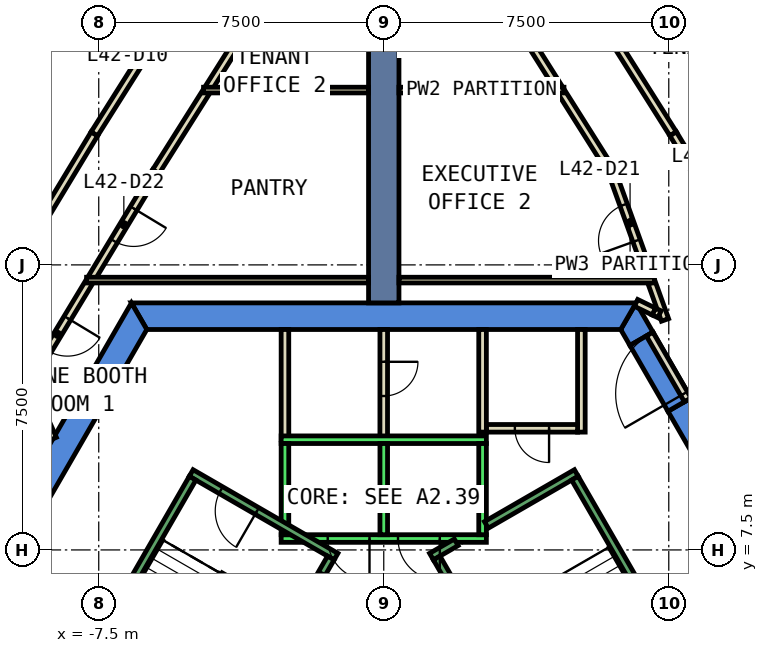
"""IFC4 building model, lengths in metres.
Left out: names, types, materials, properties, quantities, classifications, styles, units other than length and angle.
Written with IfcOpenShell. Run it as: python <this file> out.ifc"""

import sys

from ifc_helpers import new_model, si_unit, direction, frame, frame_2d, origin, place, context, subcontext, project, spatial, polyline, rectangle, outline, extrude, element, fill, save


model = new_model("IFC4")
c1 = context("Model", 3, precision=1e-05, world=origin(), true_north=direction((0.0, 1.0)))
c2 = subcontext(c1, "Body", "Model", "MODEL_VIEW")
j1 = project(units=[si_unit("LENGTHUNIT", "METRE"), si_unit("PLANEANGLEUNIT", "RADIAN")], contexts=[c1])
p1 = place(None, origin())
s1 = spatial("IfcSite", under=j1, at=p1, CompositionType="ELEMENT")
p2 = place(p1, origin())
s2 = spatial("IfcBuilding", under=s1, at=p2, CompositionType="ELEMENT")
p3 = place(p2, frame((0.0, 0.0, 189.8)))
s3 = spatial("IfcBuildingStorey", under=s2, at=p3, CompositionType="ELEMENT", Elevation=189.8)
p4 = place(p3, frame((0.0, 0.0, -0.6)))
e1 = element("IfcWall", 1, at=p4, inside=s3, PredefinedType="SHEAR", context=c2, shape_type="SweptSolid", body=[
    extrude(outline(polyline([(8.084, 11.498), (7.478, 11.148), (12.471, 2.5), (13.279, 2.5), (8.084, 11.498)])), origin(), (0.0, 0.0, 1.0), 4.4),
])
p5 = place(p3, frame((0.0, 0.0, -0.6)))
e2 = element("IfcWall", 2, at=p5, inside=s3, PredefinedType="SHEAR", context=c2, shape_type="SweptSolid", body=[
    extrude(outline(polyline([(6.478, 12.88), (7.084, 13.23), (6.64, 14.0), (6.235, 13.3), (6.478, 12.88)])), origin(), (0.0, 0.0, 1.0), 4.4),
])
p6 = place(p3, frame((0.0, 0.0, 3.6)))
e3 = element("IfcWall", 3, at=p6, inside=s3, PredefinedType="SHEAR", context=c2, shape_type="SweptSolid", body=[
    extrude(outline(polyline([(7.084, 13.23), (6.478, 12.88), (7.478, 11.148), (8.084, 11.498), (7.084, 13.23)])), origin(), (0.0, 0.0, 1.0), 0.2),
])
p7 = place(p3, frame((0.0, 0.0, -0.6)))
e4 = element("IfcWall", 4, at=p7, inside=s3, PredefinedType="SHEAR", context=c2, shape_type="SweptSolid", body=[
    extrude(outline(polyline([(6.64, 14.0), (-6.64, 14.0), (-6.235, 13.3), (6.235, 13.3), (6.64, 14.0)])), origin(), (0.0, 0.0, 1.0), 4.4),
])
p8 = place(p3, frame((0.0, 0.0, -0.6)))
e5 = element("IfcWall", 5, at=p8, inside=s3, PredefinedType="SHEAR", context=c2, shape_type="SweptSolid", body=[
    extrude(outline(polyline([(-11.834, 5.002), (-11.228, 4.652), (-6.235, 13.3), (-6.64, 14.0), (-11.834, 5.002)])), origin(), (0.0, 0.0, 1.0), 4.4),
])
p9 = place(p3, frame((0.0, 14.0, -0.6), z_axis=(0.0, 0.0, 1.0), x_axis=(0.0, 1.0, 0.0)))
e6 = element("IfcWall", 6, at=p9, inside=s3, PredefinedType="SHEAR", context=c2, shape_type="SweptSolid", body=[
    extrude(rectangle(XDim=9.0, YDim=0.8, at=frame_2d((4.5, 0.0))), origin(), (0.0, 0.0, 1.0), 4.4),
])
p10 = place(p3, frame((6.64, 14.0, 0.0), z_axis=(0.0, 0.0, 1.0), x_axis=(0.899046412443, -0.437853341055, 0.0)))
e7 = element("IfcWall", 7, at=p10, inside=s3, PredefinedType="PARTITIONING", context=c2, shape_type="SweptSolid", body=[
    extrude(rectangle(XDim=0.523, YDim=0.2, at=frame_2d((0.261, 0.0))), origin(), (0.0, 0.0, 1.0), 3.8),
])
p11 = place(p3, frame((7.401, 13.552, 0.0), z_axis=(0.0, 0.0, 1.0), x_axis=(-0.337944878606, 0.941165904091, 0.0)))
e8 = element("IfcWall", 8, at=p11, inside=s3, PredefinedType="PARTITIONING", context=c2, shape_type="SweptSolid", body=[
    extrude(rectangle(XDim=1.038, YDim=0.2, at=frame_2d((0.519, 0.0))), origin(), (0.0, 0.0, 1.0), 3.8),
])
p12 = place(p3, frame((-7.759, 14.536, 0.0), z_axis=(0.0, 0.0, 1.0), x_axis=(-0.516926279395, -0.856029918678, 0.0)))
e9 = element("IfcWall", 9, at=p12, inside=s3, PredefinedType="PARTITIONING", context=c2, shape_type="SweptSolid", body=[
    extrude(rectangle(XDim=3.188, YDim=0.2, at=frame_2d((1.594, 0.0))), origin(), (0.0, 0.0, 1.0), 3.8),
])
p13 = place(p12, frame((1.094, 0.0, 0.0)))
e10 = element("IfcOpeningElement", 10, at=p13, cuts=e9, PredefinedType="OPENING", context=c2, shape_type="SweptSolid", body=[
    extrude(rectangle(XDim=1.0, YDim=2.1, at=frame_2d((0.5, 1.05))), frame((0.0, 0.11, 0.0), z_axis=(0.0, -1.0, 0.0), x_axis=(1.0, 0.0, 0.0)), (0.0, 0.0, 1.0), 0.22),
])
p14 = place(p3, frame((-9.315, 11.801, 0.0), z_axis=(0.0, 0.0, 1.0), x_axis=(0.403943240321, -0.914784050254, 0.0)))
e11 = element("IfcWall", 11, at=p14, inside=s3, PredefinedType="PARTITIONING", context=c2, shape_type="SweptSolid", body=[
    extrude(rectangle(XDim=1.507, YDim=0.2, at=frame_2d((0.754, 0.0))), origin(), (0.0, 0.0, 1.0), 3.8),
])
p15 = place(p3, frame((6.999, 14.671, 0.0), z_axis=(0.0, 0.0, 1.0), x_axis=(-0.338795881304, 0.940859899672, 0.0)))
e12 = element("IfcWall", 12, at=p15, inside=s3, PredefinedType="PARTITIONING", context=c2, shape_type="SweptSolid", body=[
    extrude(rectangle(XDim=3.055, YDim=0.2, at=frame_2d((1.527, 0.0))), origin(), (0.0, 0.0, 1.0), 3.8),
])
p16 = place(p15, frame((1.027, 0.0, 0.0)))
e13 = element("IfcOpeningElement", 13, at=p16, cuts=e12, PredefinedType="OPENING", context=c2, shape_type="SweptSolid", body=[
    extrude(rectangle(XDim=1.0, YDim=2.1, at=frame_2d((0.5, 1.05))), frame((0.0, 0.11, 0.0), z_axis=(0.0, -1.0, 0.0), x_axis=(1.0, 0.0, 0.0)), (0.0, 0.0, 1.0), 0.22),
])
p17 = place(p3, frame((5.945, 17.535, 0.0), z_axis=(0.0, 0.0, 1.0), x_axis=(-0.533581643518, 0.845748561749, 0.0)))
e14 = element("IfcWall", 14, at=p17, inside=s3, PredefinedType="PARTITIONING", context=c2, shape_type="SweptSolid", body=[
    extrude(rectangle(XDim=2.367, YDim=0.2, at=frame_2d((1.184, 0.0))), origin(), (0.0, 0.0, 1.0), 3.8),
])
p18 = place(p3, frame((-4.682, 19.537, 0.0), z_axis=(0.0, 0.0, 1.0), x_axis=(-0.533579580306, -0.845749863423, 0.0)))
e15 = element("IfcWall", 15, at=p18, inside=s3, PredefinedType="PARTITIONING", context=c2, shape_type="SweptSolid", body=[
    extrude(rectangle(XDim=2.467, YDim=0.2, at=frame_2d((1.233, 0.0))), origin(), (0.0, 0.0, 1.0), 3.8),
])
p19 = place(p3, frame((-5.998, 17.451, 0.0), z_axis=(0.0, 0.0, 1.0), x_axis=(-0.516919907997, -0.856033766108, 0.0)))
e16 = element("IfcWall", 16, at=p19, inside=s3, PredefinedType="PARTITIONING", context=c2, shape_type="SweptSolid", body=[
    extrude(rectangle(XDim=3.256, YDim=0.2, at=frame_2d((1.628, 0.0))), origin(), (0.0, 0.0, 1.0), 3.8),
])
p20 = place(p19, frame((1.128, 0.0, 0.0)))
e17 = element("IfcOpeningElement", 17, at=p20, cuts=e16, PredefinedType="OPENING", context=c2, shape_type="SweptSolid", body=[
    extrude(rectangle(XDim=1.0, YDim=2.1, at=frame_2d((0.5, 1.05))), frame((0.0, 0.11, 0.0), z_axis=(0.0, -1.0, 0.0), x_axis=(1.0, 0.0, 0.0)), (0.0, 0.0, 1.0), 0.22),
])
p21 = place(p3, frame((4.602, 19.663, 0.0), z_axis=(0.0, 0.0, 1.0), x_axis=(-0.533664968846, 0.845695986171, 0.0)))
e18 = element("IfcWall", 18, at=p21, inside=s3, PredefinedType="PARTITIONING", context=c2, shape_type="SweptSolid", body=[
    extrude(rectangle(XDim=4.621, YDim=0.2, at=frame_2d((2.311, 0.0))), origin(), (0.0, 0.0, 1.0), 3.8),
])
p22 = place(p21, frame((1.81, 0.0, 0.0)))
e19 = element("IfcOpeningElement", 19, at=p22, cuts=e18, PredefinedType="OPENING", context=c2, shape_type="SweptSolid", body=[
    extrude(rectangle(XDim=1.0, YDim=2.1, at=frame_2d((0.5, 1.05))), frame((0.0, 0.11, 0.0), z_axis=(0.0, -1.0, 0.0), x_axis=(1.0, 0.0, 0.0)), (0.0, 0.0, 1.0), 0.22),
])
p23 = place(p3, frame((-2.136, 23.571, 0.0), z_axis=(0.0, 0.0, 1.0), x_axis=(-0.533664968846, -0.845695986171, 0.0)))
e20 = element("IfcWall", 20, at=p23, inside=s3, PredefinedType="PARTITIONING", context=c2, shape_type="SweptSolid", body=[
    extrude(rectangle(XDim=4.621, YDim=0.2, at=frame_2d((2.311, 0.0))), origin(), (0.0, 0.0, 1.0), 3.8),
])
p24 = place(p23, frame((1.81, 0.0, 0.0)))
e21 = element("IfcOpeningElement", 21, at=p24, cuts=e20, PredefinedType="OPENING", context=c2, shape_type="SweptSolid", body=[
    extrude(rectangle(XDim=1.0, YDim=2.1, at=frame_2d((0.5, 1.05))), frame((0.0, 0.11, 0.0), z_axis=(0.0, -1.0, 0.0), x_axis=(1.0, 0.0, 0.0)), (0.0, 0.0, 1.0), 0.22),
])
p25 = place(p3, frame((5.489, 21.817, 0.0), z_axis=(0.0, 0.0, 1.0), x_axis=(0.533790022325, -0.845617059943, 0.0)))
e22 = element("IfcWall", 22, at=p25, inside=s3, PredefinedType="PARTITIONING", context=c2, shape_type="SweptSolid", body=[
    extrude(rectangle(XDim=3.983, YDim=0.2, at=frame_2d((1.991, 0.0))), origin(), (0.0, 0.0, 1.0), 3.8),
])
p26 = place(p3, frame((7.615, 18.449, 0.0), z_axis=(0.0, 0.0, 1.0), x_axis=(0.516918251554, -0.856034766356, 0.0)))
e23 = element("IfcWall", 23, at=p26, inside=s3, PredefinedType="PARTITIONING", context=c2, shape_type="SweptSolid", body=[
    extrude(rectangle(XDim=3.983, YDim=0.2, at=frame_2d((1.992, 0.0))), origin(), (0.0, 0.0, 1.0), 3.8),
])
p27 = place(p26, frame((1.492, 0.0, 0.0)))
e24 = element("IfcOpeningElement", 24, at=p27, cuts=e23, PredefinedType="OPENING", context=c2, shape_type="SweptSolid", body=[
    extrude(rectangle(XDim=1.0, YDim=2.1, at=frame_2d((0.5, 1.05))), frame((0.0, 0.11, 0.0), z_axis=(0.0, -1.0, 0.0), x_axis=(1.0, 0.0, 0.0)), (0.0, 0.0, 1.0), 0.22),
])
p28 = place(p3, frame((-9.674, 15.039, 0.0), z_axis=(0.0, 0.0, 1.0), x_axis=(0.516918251554, 0.856034766356, 0.0)))
e25 = element("IfcWall", 25, at=p28, inside=s3, PredefinedType="PARTITIONING", context=c2, shape_type="SweptSolid", body=[
    extrude(rectangle(XDim=3.983, YDim=0.2, at=frame_2d((1.992, 0.0))), origin(), (0.0, 0.0, 1.0), 3.8),
])
p29 = place(p3, frame((-7.615, 18.449, 0.0), z_axis=(0.0, 0.0, 1.0), x_axis=(0.533699180497, 0.845674396406, 0.0)))
e26 = element("IfcWall", 26, at=p29, inside=s3, PredefinedType="PARTITIONING", context=c2, shape_type="SweptSolid", body=[
    extrude(rectangle(XDim=7.504, YDim=0.2, at=frame_2d((3.752, 0.0))), origin(), (0.0, 0.0, 1.0), 3.8),
])
p30 = place(p29, frame((3.252, 0.0, 0.0)))
e27 = element("IfcOpeningElement", 27, at=p30, cuts=e26, PredefinedType="OPENING", context=c2, shape_type="SweptSolid", body=[
    extrude(rectangle(XDim=1.0, YDim=2.1, at=frame_2d((0.5, 1.05))), frame((0.0, 0.11, 0.0), z_axis=(0.0, -1.0, 0.0), x_axis=(1.0, 0.0, 0.0)), (0.0, 0.0, 1.0), 0.22),
])
p31 = place(p3, frame((5.2, 13.3, 0.0), z_axis=(0.0, 0.0, 1.0), x_axis=(0.0, -1.0, 0.0)))
e28 = element("IfcWall", 28, at=p31, inside=s3, PredefinedType="PARTITIONING", context=c2, shape_type="SweptSolid", body=[
    extrude(rectangle(XDim=2.7, YDim=0.2, at=frame_2d((1.35, 0.0))), origin(), (0.0, 0.0, 1.0), 3.8),
])
p32 = place(p3, frame((5.1, 10.7, 0.0), z_axis=(0.0, 0.0, 1.0), x_axis=(-1.0, 0.0, 0.0)))
e29 = element("IfcWall", 29, at=p32, inside=s3, PredefinedType="PARTITIONING", context=c2, shape_type="SweptSolid", body=[
    extrude(rectangle(XDim=2.4, YDim=0.2, at=frame_2d((1.2, 0.0))), origin(), (0.0, 0.0, 1.0), 3.8),
])
p33 = place(p32, frame((0.75, 0.0, 0.0)))
e30 = element("IfcOpeningElement", 30, at=p33, cuts=e29, PredefinedType="OPENING", context=c2, shape_type="SweptSolid", body=[
    extrude(rectangle(XDim=0.9, YDim=2.1, at=frame_2d((0.45, 1.05))), frame((0.0, 0.11, 0.0), z_axis=(0.0, -1.0, 0.0), x_axis=(1.0, 0.0, 0.0)), (0.0, 0.0, 1.0), 0.22),
])
p34 = place(p3, frame((2.6, 10.6, 0.0), z_axis=(0.0, 0.0, 1.0), x_axis=(0.0, 1.0, 0.0)))
e31 = element("IfcWall", 31, at=p34, inside=s3, PredefinedType="PARTITIONING", context=c2, shape_type="SweptSolid", body=[
    extrude(rectangle(XDim=2.7, YDim=0.2, at=frame_2d((1.35, 0.0))), origin(), (0.0, 0.0, 1.0), 3.8),
])
p35 = place(p3, frame((-2.599, 10.399, 0.0), z_axis=(0.0, 0.0, 1.0), x_axis=(-0.000336615314, 0.999999943345, 0.0)))
e32 = element("IfcWall", 32, at=p35, inside=s3, PredefinedType="PARTITIONING", context=c2, shape_type="SweptSolid", body=[
    extrude(rectangle(XDim=2.901, YDim=0.2, at=frame_2d((1.451, 0.0))), origin(), (0.0, 0.0, 1.0), 3.8),
])
p36 = place(p3, frame((0.0, 13.3, 0.0), z_axis=(0.0, 0.0, 1.0), x_axis=(-0.000336728662, -0.999999943307, 0.0)))
e33 = element("IfcWall", 33, at=p36, inside=s3, PredefinedType="PARTITIONING", context=c2, shape_type="SweptSolid", body=[
    extrude(rectangle(XDim=2.9, YDim=0.2, at=frame_2d((1.45, 0.0))), origin(), (0.0, 0.0, 1.0), 3.8),
])
p37 = place(p36, frame((0.85, 0.0, 0.0)))
e34 = element("IfcOpeningElement", 34, at=p37, cuts=e33, PredefinedType="OPENING", context=c2, shape_type="SweptSolid", body=[
    extrude(rectangle(XDim=0.9, YDim=2.1, at=frame_2d((0.45, 1.05))), frame((0.0, 0.11, 0.0), z_axis=(0.0, -1.0, 0.0), x_axis=(1.0, 0.0, 0.0)), (0.0, 0.0, 1.0), 0.22),
])
p38 = place(p3, frame((7.124, 14.6, 0.0), z_axis=(0.0, 0.0, 1.0), x_axis=(-1.0, 0.0, 0.0)))
e35 = element("IfcWall", 35, at=p38, inside=s3, PredefinedType="PARTITIONING", context=c2, shape_type="SweptSolid", body=[
    extrude(rectangle(XDim=6.724, YDim=0.15, at=frame_2d((3.362, 0.0))), origin(), (0.0, 0.0, 1.0), 3.8),
])
p39 = place(p3, frame((-0.4, 14.6, 0.0), z_axis=(0.0, 0.0, 1.0), x_axis=(-1.0, 0.0, 0.0)))
e36 = element("IfcWall", 36, at=p39, inside=s3, PredefinedType="PARTITIONING", context=c2, shape_type="SweptSolid", body=[
    extrude(rectangle(XDim=7.42, YDim=0.15, at=frame_2d((3.71, 0.0))), origin(), (0.0, 0.0, 1.0), 3.8),
])
for number, where, z_axis, x_axis in (
    (37, (0.4, 19.6, 0.0), (0.0, 0.0, 1.0), (1.0, 0.0, 0.0)),
    (38, (-4.742, 19.6, 0.0), (0.0, 0.0, 1.0), (1.0, 0.0, 0.0)),
):
    element("IfcWall", number, at=place(p3, frame(where, z_axis=z_axis, x_axis=x_axis)), inside=s3, PredefinedType="PARTITIONING", context=c2, shape_type="SweptSolid", body=[
        extrude(rectangle(XDim=4.342, YDim=0.15, at=frame_2d((2.171, 0.0))), origin(), (0.0, 0.0, 1.0), 3.8),
    ])
p40 = place(p3, frame((7.997, 11.448, 0.0), z_axis=(0.0, 0.0, 1.0), x_axis=(-0.50002537861, 0.866010750942, 0.0)))
e39 = element("IfcWall", 39, at=p40, inside=s3, PredefinedType="PARTITIONING", context=c2, shape_type="SweptSolid", body=[
    extrude(rectangle(XDim=2.0, YDim=0.2, at=frame_2d((1.0, 0.0))), origin(), (0.0, 0.0, 1.0), 2.4),
])
p41 = place(p40, frame((0.19, 0.0, 0.0)))
e40 = element("IfcOpeningElement", 40, at=p41, cuts=e39, PredefinedType="OPENING", context=c2, shape_type="SweptSolid", body=[
    extrude(rectangle(XDim=1.8, YDim=2.1, at=frame_2d((0.9, 1.05))), frame((0.0, 0.11, 0.0), z_axis=(0.0, -1.0, 0.0), x_axis=(1.0, 0.0, 0.0)), (0.0, 0.0, 1.0), 0.22),
])
p42 = place(p3, frame((7.11, 13.771, 0.0), z_axis=(0.0, 0.0, 1.0), x_axis=(0.900120852209, -0.435640277545, 0.0)))
e41 = element("IfcWall", 41, at=p42, inside=s3, PredefinedType="PARTITIONING", context=c2, shape_type="SweptSolid", body=[
    extrude(rectangle(XDim=0.161, YDim=0.2, at=frame_2d((0.081, 0.0))), origin(), (0.0, 0.0, 1.0), 2.4),
])
p43 = place(p3, frame((2.7, 7.8, 0.0), z_axis=(0.0, 0.0, 1.0), x_axis=(-1.0, 0.0, 0.0)))
e42 = element("IfcWall", 42, at=p43, inside=s3, PredefinedType="STANDARD", context=c2, shape_type="SweptSolid", body=[
    extrude(rectangle(XDim=5.4, YDim=0.2, at=frame_2d((2.7, 0.0))), origin(), (0.0, 0.0, 1.0), 3.8),
])
p44 = place(p43, frame((1.225, 0.0, 0.0)))
e43 = element("IfcOpeningElement", 43, at=p44, cuts=e42, PredefinedType="OPENING", context=c2, shape_type="SweptSolid", body=[
    extrude(rectangle(XDim=1.1, YDim=2.1, at=frame_2d((0.55, 1.05))), frame((0.0, 0.11, 0.0), z_axis=(0.0, -1.0, 0.0), x_axis=(1.0, 0.0, 0.0)), (0.0, 0.0, 1.0), 0.22),
])
p45 = place(p43, frame((3.075, 0.0, 0.0)))
e44 = element("IfcOpeningElement", 44, at=p45, cuts=e42, PredefinedType="OPENING", context=c2, shape_type="SweptSolid", body=[
    extrude(rectangle(XDim=1.1, YDim=2.1, at=frame_2d((0.55, 1.05))), frame((0.0, 0.11, 0.0), z_axis=(0.0, -1.0, 0.0), x_axis=(1.0, 0.0, 0.0)), (0.0, 0.0, 1.0), 0.22),
])
p46 = place(p3, frame((2.7, 10.4, 0.0), z_axis=(0.0, 0.0, 1.0), x_axis=(-1.0, 0.0, 0.0)))
e45 = element("IfcWall", 45, at=p46, inside=s3, PredefinedType="STANDARD", context=c2, shape_type="SweptSolid", body=[
    extrude(rectangle(XDim=5.4, YDim=0.2, at=frame_2d((2.7, 0.0))), origin(), (0.0, 0.0, 1.0), 3.8),
])
for number, where, z_axis, x_axis in (
    (46, (2.6, 7.9, 0.0), (0.0, 0.0, 1.0), (0.0, 1.0, 0.0)),
    (47, (0.0, 7.9, 0.0), (0.0, 0.0, 1.0), (0.0, 1.0, 0.0)),
    (48, (-2.6, 7.9, 0.0), (0.0, 0.0, 1.0), (0.0, 1.0, 0.0)),
):
    element("IfcWall", number, at=place(p3, frame(where, z_axis=z_axis, x_axis=x_axis)), inside=s3, PredefinedType="STANDARD", context=c2, shape_type="SweptSolid", body=[
        extrude(rectangle(XDim=2.4, YDim=0.2, at=frame_2d((1.2, 0.0))), origin(), (0.0, 0.0, 1.0), 3.8),
    ])
p47 = place(p3, frame((2.7, 8.158, 0.0), z_axis=(0.0, 0.0, 1.0), x_axis=(0.86611865017, 0.499838457731, 0.0)))
e49 = element("IfcWall", 49, at=p47, inside=s3, PredefinedType="STANDARD", context=c2, shape_type="SweptSolid", body=[
    extrude(rectangle(XDim=2.733, YDim=0.2, at=frame_2d((1.366, 0.0))), origin(), (0.0, 0.0, 1.0), 3.8),
])
p48 = place(p3, frame((1.256, 7.324, 0.0), z_axis=(0.0, 0.0, 1.0), x_axis=(0.865915093549, 0.500191014278, 0.0)))
e50 = element("IfcWall", 50, at=p48, inside=s3, PredefinedType="STANDARD", context=c2, shape_type="SweptSolid", body=[
    extrude(rectangle(XDim=0.752, YDim=0.2, at=frame_2d((0.376, 0.0))), origin(), (0.0, 0.0, 1.0), 3.8),
])
p49 = place(p3, frame((4.843, 1.312, 0.0), z_axis=(0.0, 0.0, 1.0), x_axis=(-0.499963383562, 0.866046543262, 0.0)))
e51 = element("IfcWall", 51, at=p49, inside=s3, PredefinedType="STANDARD", context=c2, shape_type="SweptSolid", body=[
    extrude(rectangle(XDim=6.9, YDim=0.2, at=frame_2d((3.45, 0.0))), origin(), (0.0, 0.0, 1.0), 3.8),
])
p50 = place(p49, frame((0.45, 0.0, 0.0)))
e52 = element("IfcOpeningElement", 52, at=p50, cuts=e51, PredefinedType="OPENING", context=c2, shape_type="SweptSolid", body=[
    extrude(rectangle(XDim=1.1, YDim=2.2, at=frame_2d((0.55, 1.1))), frame((0.0, 0.11, 0.0), z_axis=(0.0, -1.0, 0.0), x_axis=(1.0, 0.0, 0.0)), (0.0, 0.0, 1.0), 0.22),
])
p51 = place(p3, frame((8.48, 3.412, 0.0), z_axis=(0.0, 0.0, 1.0), x_axis=(-0.499978703459, 0.866037698999, 0.0)))
e53 = element("IfcWall", 53, at=p51, inside=s3, PredefinedType="STANDARD", context=c2, shape_type="SweptSolid", body=[
    extrude(rectangle(XDim=6.9, YDim=0.2, at=frame_2d((3.45, 0.0))), origin(), (0.0, 0.0, 1.0), 3.8),
])
p52 = place(p3, frame((-1.256, 7.324, 0.0), z_axis=(0.0, 0.0, 1.0), x_axis=(-0.866046073146, 0.499964197906, 0.0)))
e54 = element("IfcWall", 54, at=p52, inside=s3, PredefinedType="STANDARD", context=c2, shape_type="SweptSolid", body=[
    extrude(rectangle(XDim=4.4, YDim=0.2, at=frame_2d((2.2, 0.0))), origin(), (0.0, 0.0, 1.0), 3.8),
])
p53 = place(p52, frame((2.4, 0.0, 0.0)))
e55 = element("IfcOpeningElement", 55, at=p53, cuts=e54, PredefinedType="OPENING", context=c2, shape_type="SweptSolid", body=[
    extrude(rectangle(XDim=1.1, YDim=2.2, at=frame_2d((0.55, 1.1))), frame((0.0, 0.11, 0.0), z_axis=(0.0, -1.0, 0.0), x_axis=(1.0, 0.0, 0.0)), (0.0, 0.0, 1.0), 0.22),
])
p54 = place(p3, frame((-1.393, 7.288, 0.0), z_axis=(0.0, 0.0, 1.0), x_axis=(-0.499963383562, -0.866046543262, 0.0)))
e56 = element("IfcWall", 56, at=p54, inside=s3, PredefinedType="STANDARD", context=c2, shape_type="SweptSolid", body=[
    extrude(rectangle(XDim=6.9, YDim=0.2, at=frame_2d((3.45, 0.0))), origin(), (0.0, 0.0, 1.0), 3.8),
])
p55 = place(p54, frame((0.45, 0.0, 0.0)))
e57 = element("IfcOpeningElement", 57, at=p55, cuts=e56, PredefinedType="OPENING", context=c2, shape_type="SweptSolid", body=[
    extrude(rectangle(XDim=1.1, YDim=2.2, at=frame_2d((0.55, 1.1))), frame((0.0, 0.11, 0.0), z_axis=(0.0, -1.0, 0.0), x_axis=(1.0, 0.0, 0.0)), (0.0, 0.0, 1.0), 0.22),
])
p56 = place(p3, frame((-5.03, 9.388, 0.0), z_axis=(0.0, 0.0, 1.0), x_axis=(-0.499978703459, -0.866037698999, 0.0)))
e58 = element("IfcWall", 58, at=p56, inside=s3, PredefinedType="STANDARD", context=c2, shape_type="SweptSolid", body=[
    extrude(rectangle(XDim=6.9, YDim=0.2, at=frame_2d((3.45, 0.0))), origin(), (0.0, 0.0, 1.0), 3.8),
])
p57 = place(p16, origin())
e59 = element("IfcDoor", 59, at=p57, inside=s3, OperationType="SINGLE_SWING_LEFT", PredefinedType="DOOR", context=c2, shape_type="SweptSolid", body=[
    extrude(rectangle(XDim=1.0, YDim=2.1, at=frame_2d((0.5, 1.05))), frame((0.0, 0.025, 0.0), z_axis=(0.0, -1.0, 0.0), x_axis=(1.0, 0.0, 0.0)), (0.0, 0.0, 1.0), 0.05),
])
fill(e13, e59)
p58 = place(p20, origin())
e60 = element("IfcDoor", 60, at=p58, inside=s3, OperationType="SINGLE_SWING_RIGHT", PredefinedType="DOOR", context=c2, shape_type="SweptSolid", body=[
    extrude(rectangle(XDim=1.0, YDim=2.1, at=frame_2d((0.5, 1.05))), frame((0.0, 0.025, 0.0), z_axis=(0.0, -1.0, 0.0), x_axis=(1.0, 0.0, 0.0)), (0.0, 0.0, 1.0), 0.05),
])
fill(e17, e60)
p59 = place(p13, origin())
e61 = element("IfcDoor", 61, at=p59, inside=s3, OperationType="SINGLE_SWING_LEFT", PredefinedType="DOOR", context=c2, shape_type="SweptSolid", body=[
    extrude(rectangle(XDim=1.0, YDim=2.1, at=frame_2d((0.5, 1.05))), frame((0.0, 0.025, 0.0), z_axis=(0.0, -1.0, 0.0), x_axis=(1.0, 0.0, 0.0)), (0.0, 0.0, 1.0), 0.05),
])
fill(e10, e61)
p60 = place(p33, origin())
e62 = element("IfcDoor", 62, at=p60, inside=s3, OperationType="SINGLE_SWING_RIGHT", PredefinedType="DOOR", context=c2, shape_type="SweptSolid", body=[
    extrude(rectangle(XDim=0.9, YDim=2.1, at=frame_2d((0.45, 1.05))), frame((0.0, 0.025, 0.0), z_axis=(0.0, -1.0, 0.0), x_axis=(1.0, 0.0, 0.0)), (0.0, 0.0, 1.0), 0.05),
])
fill(e30, e62)
p61 = place(p37, origin())
e63 = element("IfcDoor", 63, at=p61, inside=s3, OperationType="SINGLE_SWING_RIGHT", PredefinedType="DOOR", context=c2, shape_type="SweptSolid", body=[
    extrude(rectangle(XDim=0.9, YDim=2.1, at=frame_2d((0.45, 1.05))), frame((0.0, 0.025, 0.0), z_axis=(0.0, -1.0, 0.0), x_axis=(1.0, 0.0, 0.0)), (0.0, 0.0, 1.0), 0.05),
])
fill(e34, e63)
p62 = place(p41, origin())
e64 = element("IfcDoor", 64, at=p62, inside=s3, OperationType="DOUBLE_DOOR_SINGLE_SWING", PredefinedType="DOOR", context=c2, shape_type="SweptSolid", body=[
    extrude(rectangle(XDim=1.8, YDim=2.1, at=frame_2d((0.9, 1.05))), frame((0.0, 0.025, 0.0), z_axis=(0.0, -1.0, 0.0), x_axis=(1.0, 0.0, 0.0)), (0.0, 0.0, 1.0), 0.05),
])
fill(e40, e64)
p63 = place(p44, origin())
e65 = element("IfcDoor", 65, at=p63, inside=s3, OperationType="SLIDING_TO_LEFT", PredefinedType="DOOR", context=c2, shape_type="SweptSolid", body=[
    extrude(rectangle(XDim=1.1, YDim=2.1, at=frame_2d((0.55, 1.05))), frame((0.0, 0.025, 0.0), z_axis=(0.0, -1.0, 0.0), x_axis=(1.0, 0.0, 0.0)), (0.0, 0.0, 1.0), 0.05),
])
fill(e43, e65)
p64 = place(p45, origin())
e66 = element("IfcDoor", 66, at=p64, inside=s3, OperationType="SLIDING_TO_LEFT", PredefinedType="DOOR", context=c2, shape_type="SweptSolid", body=[
    extrude(rectangle(XDim=1.1, YDim=2.1, at=frame_2d((0.55, 1.05))), frame((0.0, 0.025, 0.0), z_axis=(0.0, -1.0, 0.0), x_axis=(1.0, 0.0, 0.0)), (0.0, 0.0, 1.0), 0.05),
])
fill(e44, e66)
p65 = place(p55, origin())
e67 = element("IfcDoor", 67, at=p65, inside=s3, OperationType="SINGLE_SWING_LEFT", PredefinedType="DOOR", context=c2, shape_type="SweptSolid", body=[
    extrude(rectangle(XDim=1.1, YDim=2.2, at=frame_2d((0.55, 1.1))), frame((0.0, 0.025, 0.0), z_axis=(0.0, -1.0, 0.0), x_axis=(1.0, 0.0, 0.0)), (0.0, 0.0, 1.0), 0.05),
])
fill(e57, e67)
p66 = place(p53, origin())
e68 = element("IfcDoor", 68, at=p66, inside=s3, OperationType="SINGLE_SWING_LEFT", PredefinedType="DOOR", context=c2, shape_type="SweptSolid", body=[
    extrude(rectangle(XDim=1.1, YDim=2.2, at=frame_2d((0.55, 1.1))), frame((0.0, 0.025, 0.0), z_axis=(0.0, -1.0, 0.0), x_axis=(1.0, 0.0, 0.0)), (0.0, 0.0, 1.0), 0.05),
])
fill(e55, e68)
save(model, sys.argv[1])
